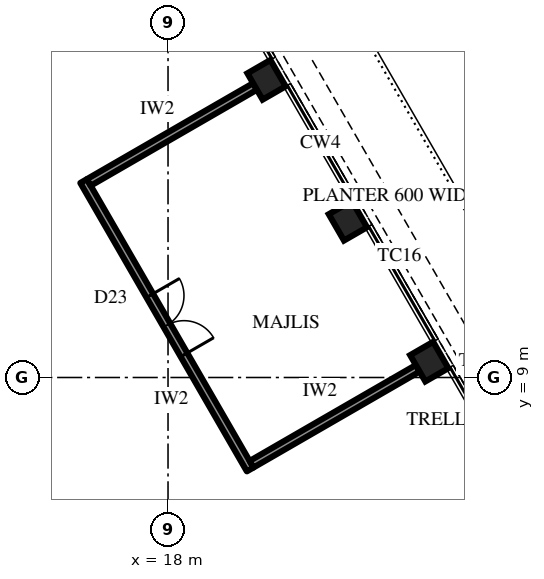
"""IFC4 building model, lengths in metres.
Left out: names, types, materials, properties, quantities, classifications, styles, units other than length and angle.
Written with IfcOpenShell. Run it as: python <this file> out.ifc"""

import sys

from ifc_helpers import new_model, si_unit, direction, frame, frame_2d, origin, origin_2d, place, context, subcontext, project, spatial, rectangle, extrude, element, fill, save


model = new_model("IFC4")
c1 = context("Model", 3, precision=1e-05, world=origin(), true_north=direction((0.0, 1.0)))
c2 = subcontext(c1, "Body", "Model", "MODEL_VIEW")
j1 = project(units=[si_unit("LENGTHUNIT", "METRE"), si_unit("PLANEANGLEUNIT", "RADIAN")], contexts=[c1])
p1 = place(None, origin())
s1 = spatial("IfcSite", under=j1, at=p1, CompositionType="ELEMENT")
p2 = place(p1, origin())
s2 = spatial("IfcBuilding", under=s1, at=p2, CompositionType="ELEMENT")
p3 = place(p2, frame((0.0, 0.0, 382.9)))
s3 = spatial("IfcBuildingStorey", under=s2, at=p3, CompositionType="ELEMENT", Elevation=382.9)
for number, where, z_axis, x_axis in (
    (1, (24.874, 9.417, 0.0), (0.0, 0.0, 1.0), (-0.5, 0.866, 0.0)),
    (2, (22.733, 13.125, 0.0), (0.0, 0.0, 1.0), (-0.5, 0.866, 0.0)),
    (3, (20.592, 16.833, 0.0), (0.0, 0.0, 1.0), (-0.5, 0.866, 0.0)),
):
    element("IfcColumn", number, at=place(p3, frame(where, z_axis=z_axis, x_axis=x_axis)), inside=s3, PredefinedType="COLUMN", context=c2, shape_type="SweptSolid", body=[
        extrude(rectangle(XDim=0.8, YDim=0.7, at=origin_2d()), origin(), (0.0, 0.0, 1.0), 4.2),
    ])
p4 = place(p3, frame((20.161, 6.58, 0.0), z_axis=(0.0, 0.0, 1.0), x_axis=(-0.500006995557, 0.86602136486, 0.0)))
e4 = element("IfcWall", 4, at=p4, inside=s3, PredefinedType="PARTITIONING", context=c2, shape_type="SweptSolid", body=[
    extrude(rectangle(XDim=8.764, YDim=0.2, at=frame_2d((4.382, 0.0))), origin(), (0.0, 0.0, 1.0), 4.0),
])
p5 = place(p4, frame((3.482, 0.0, 0.0)))
e5 = element("IfcOpeningElement", 5, at=p5, cuts=e4, PredefinedType="OPENING", context=c2, shape_type="SweptSolid", body=[
    extrude(rectangle(XDim=1.8, YDim=2.4, at=frame_2d((0.9, 1.2))), frame((0.0, 0.11, 0.0), z_axis=(0.0, -1.0, 0.0), x_axis=(1.0, 0.0, 0.0)), (0.0, 0.0, 1.0), 0.22),
])
p6 = place(p3, frame((20.198, 6.717, 0.0), z_axis=(0.0, 0.0, 1.0), x_axis=(0.866006046928, 0.500033525561, 0.0)))
e6 = element("IfcWall", 6, at=p6, inside=s3, PredefinedType="PARTITIONING", context=c2, shape_type="SweptSolid", body=[
    extrude(rectangle(XDim=5.05, YDim=0.2, at=frame_2d((2.525, 0.0))), origin(), (0.0, 0.0, 1.0), 2.992),
])
p7 = place(p3, frame((15.916, 14.133, 0.0), z_axis=(0.0, 0.0, 1.0), x_axis=(0.866018134068, 0.500012591307, 0.0)))
e7 = element("IfcWall", 7, at=p7, inside=s3, PredefinedType="PARTITIONING", context=c2, shape_type="SweptSolid", body=[
    extrude(rectangle(XDim=5.05, YDim=0.2, at=frame_2d((2.525, 0.0))), origin(), (0.0, 0.0, 1.0), 3.082),
])
p8 = place(p5, frame((1.8, 0.0, 0.0), z_axis=(0.0, 0.0, 1.0), x_axis=(-1.0, 0.0, 0.0)))
e8 = element("IfcDoor", 8, at=p8, inside=s3, OperationType="DOUBLE_DOOR_SINGLE_SWING", PredefinedType="DOOR", context=c2, shape_type="SweptSolid", body=[
    extrude(rectangle(XDim=1.8, YDim=2.4, at=frame_2d((0.9, 1.2))), frame((0.0, 0.025, 0.0), z_axis=(0.0, -1.0, 0.0), x_axis=(1.0, 0.0, 0.0)), (0.0, 0.0, 1.0), 0.05),
])
fill(e5, e8)
save(model, sys.argv[1])
